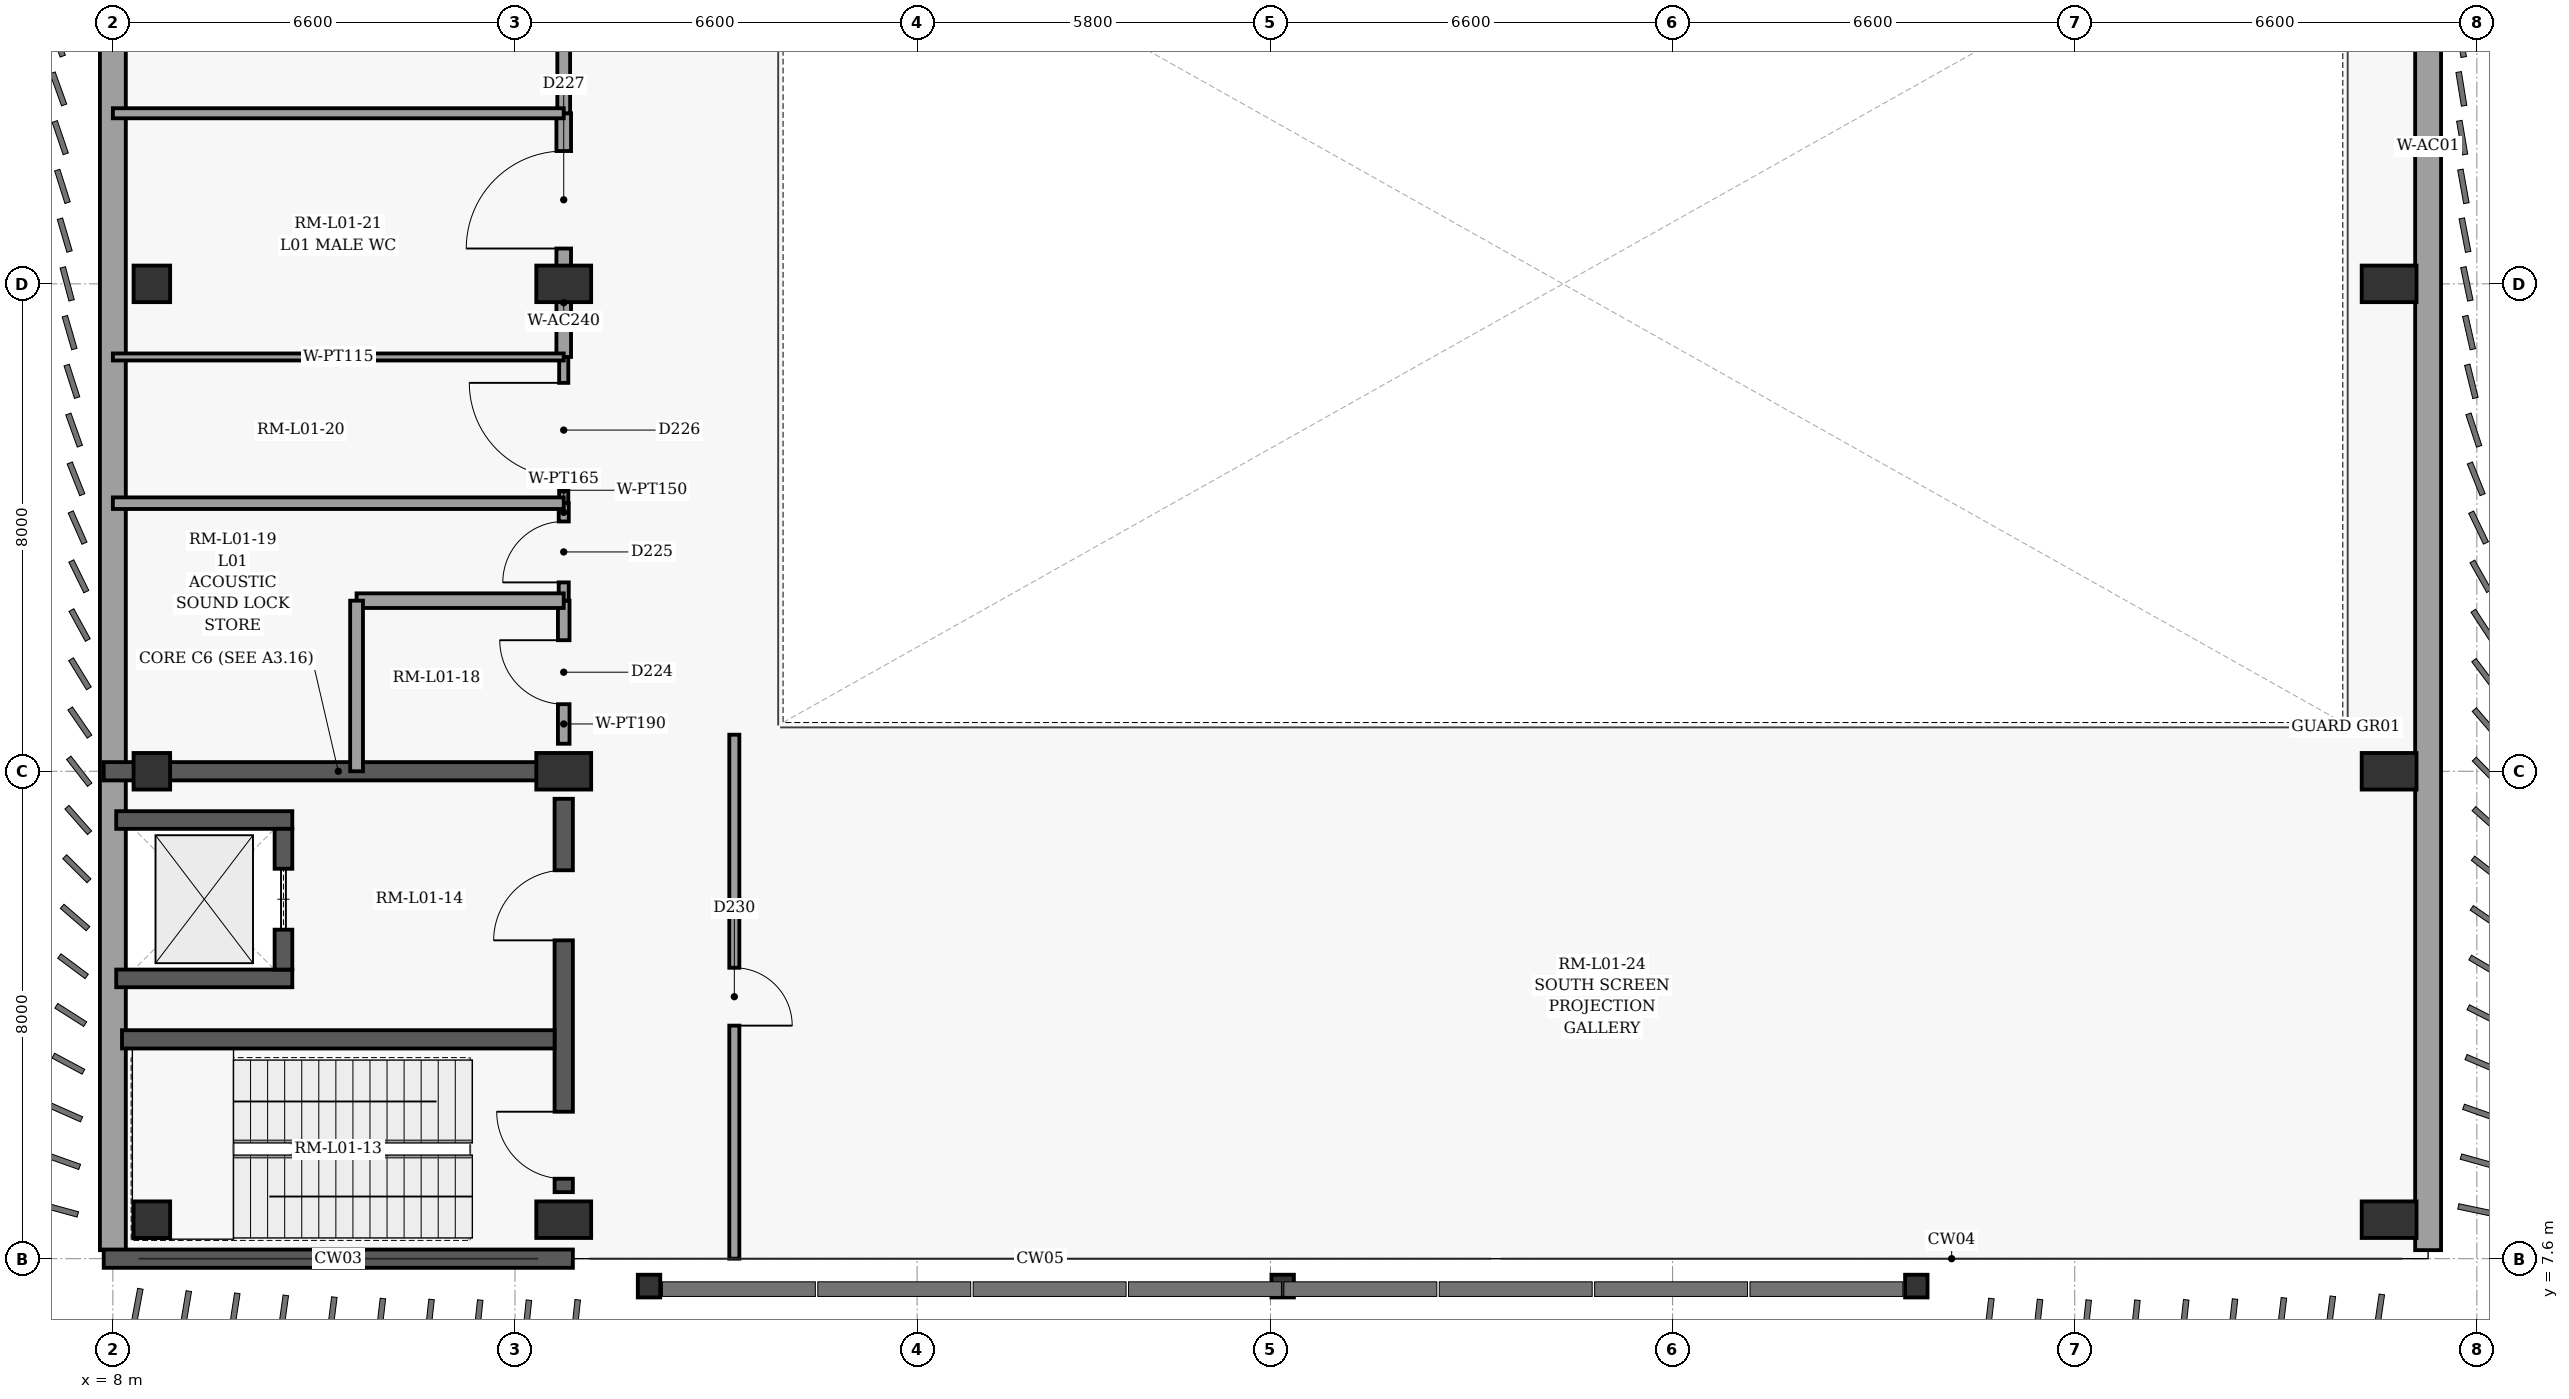
"""IFC4 building model, lengths in metres.
Left out: names, types, materials, properties, quantities, classifications, styles, units other than length and angle.
Written with IfcOpenShell. Run it as: python <this file> out.ifc"""

import sys

from ifc_helpers import new_model, si_unit, direction, frame, frame_2d, origin, origin_2d, place, context, subcontext, project, spatial, rectangle, i_section, extrude, element, fill, save


model = new_model("IFC4")
c1 = context("Model", 3, precision=1e-05, world=origin(), true_north=direction((0.0, 1.0)))
c2 = subcontext(c1, "Body", "Model", "MODEL_VIEW")
j1 = project(units=[si_unit("LENGTHUNIT", "METRE"), si_unit("PLANEANGLEUNIT", "RADIAN")], contexts=[c1])
p1 = place(None, origin())
s1 = spatial("IfcSite", under=j1, at=p1, CompositionType="ELEMENT")
p2 = place(p1, origin())
s2 = spatial("IfcBuilding", under=s1, at=p2, CompositionType="ELEMENT")
p3 = place(p2, frame((0.0, 0.0, 5.4)))
s3 = spatial("IfcBuildingStorey", under=s2, at=p3, CompositionType="ELEMENT", Elevation=5.4)
for number, where, z_axis, x_axis in (
    (1, (8.64, 8.24, 0.0), (0.0, 0.0, 1.0), (1.0, 0.0, 0.0)),
    (2, (8.64, 15.6, 0.0), (0.0, 0.0, 1.0), (1.0, 0.0, 0.0)),
    (3, (8.64, 23.6, 0.0), (0.0, 0.0, 1.0), (1.0, 0.0, 0.0)),
):
    element("IfcColumn", number, at=place(p3, frame(where, z_axis=z_axis, x_axis=x_axis)), inside=s3, PredefinedType="COLUMN", context=c2, shape_type="SweptSolid", body=[
        extrude(rectangle(XDim=0.6, YDim=0.6, at=origin_2d()), origin(), (0.0, 0.0, 1.0), 4.8),
    ])
for number, where, z_axis, x_axis in (
    (4, (15.4, 8.24, 0.0), (0.0, 0.0, 1.0), (1.0, 0.0, 0.0)),
    (5, (15.4, 15.6, 0.0), (0.0, 0.0, 1.0), (1.0, 0.0, 0.0)),
    (6, (15.4, 23.6, 0.0), (0.0, 0.0, 1.0), (1.0, 0.0, 0.0)),
    (7, (45.36, 8.24, 0.0), (0.0, 0.0, 1.0), (1.0, 0.0, 0.0)),
    (8, (45.36, 15.6, 0.0), (0.0, 0.0, 1.0), (1.0, 0.0, 0.0)),
    (9, (45.36, 23.6, 0.0), (0.0, 0.0, 1.0), (1.0, 0.0, 0.0)),
):
    element("IfcColumn", number, at=place(p3, frame(where, z_axis=z_axis, x_axis=x_axis)), inside=s3, PredefinedType="COLUMN", context=c2, shape_type="SweptSolid", body=[
        extrude(rectangle(XDim=0.6, YDim=0.9, at=origin_2d()), origin(), (0.0, 0.0, 1.0), 4.8),
    ])
for number, where, z_axis, x_axis in (
    (10, (16.8, 7.15, 0.0), (0.0, 0.0, 1.0), (1.0, 0.0, 0.0)),
    (11, (27.2, 7.15, 0.0), (0.0, 0.0, 1.0), (1.0, 0.0, 0.0)),
    (12, (37.6, 7.15, 0.0), (0.0, 0.0, 1.0), (1.0, 0.0, 0.0)),
):
    element("IfcColumn", number, at=place(p3, frame(where, z_axis=z_axis, x_axis=x_axis)), inside=s3, PredefinedType="COLUMN", context=c2, shape_type="SweptSolid", body=[
        extrude(i_section(OverallWidth=0.373, OverallDepth=0.368, WebThickness=0.014, FlangeThickness=0.024, at=origin_2d()), origin(), (0.0, 0.0, 1.0), 4.8),
    ])
for number, where, z_axis, x_axis in (
    (13, (46.0, 63.46, 0.0), (0.0, 0.0, 1.0), (0.0, -1.0, 0.0)),
    (14, (8.0, 7.74, 0.0), (0.0, 0.0, 1.0), (0.0, 1.0, 0.0)),
):
    element("IfcWall", number, at=place(p3, frame(where, z_axis=z_axis, x_axis=x_axis)), inside=s3, PredefinedType="SOLIDWALL", context=c2, shape_type="SweptSolid", body=[
        extrude(rectangle(XDim=55.72, YDim=0.425, at=frame_2d((27.86, 0.0))), origin(), (0.0, 0.0, 1.0), 4.52),
    ])
p4 = place(p3, frame((7.85, 7.6, 0.0), z_axis=(0.0, 0.0, 1.0), x_axis=(1.0, 0.0, 0.0)))
e15 = element("IfcWall", 15, at=p4, inside=s3, PredefinedType="SHEAR", context=c2, shape_type="SweptSolid", body=[
    extrude(rectangle(XDim=7.7, YDim=0.3, at=frame_2d((3.85, 0.0))), origin(), (0.0, 0.0, 1.0), 4.52),
])
p5 = place(p3, frame((7.85, 15.6, 0.0), z_axis=(0.0, 0.0, 1.0), x_axis=(1.0, 0.0, 0.0)))
e16 = element("IfcWall", 16, at=p5, inside=s3, PredefinedType="SHEAR", context=c2, shape_type="SweptSolid", body=[
    extrude(rectangle(XDim=7.248, YDim=0.3, at=frame_2d((3.624, 0.0))), origin(), (0.0, 0.0, 1.0), 4.52),
])
p6 = place(p3, frame((15.4, 8.692, 0.0), z_axis=(0.0, 0.0, 1.0), x_axis=(0.0, 1.0, 0.0)))
e17 = element("IfcWall", 17, at=p6, inside=s3, PredefinedType="SHEAR", context=c2, shape_type="SweptSolid", body=[
    extrude(rectangle(XDim=6.456, YDim=0.3, at=frame_2d((3.228, 0.0))), origin(), (0.0, 0.0, 1.0), 4.52),
])
p7 = place(p6, frame((0.22, 0.0, 0.0)))
e18 = element("IfcOpeningElement", 18, at=p7, cuts=e17, PredefinedType="OPENING", context=c2, shape_type="SweptSolid", body=[
    extrude(rectangle(XDim=1.1, YDim=2.15, at=frame_2d((0.55, 1.075))), frame((0.0, 0.16, 0.0), z_axis=(0.0, -1.0, 0.0), x_axis=(1.0, 0.0, 0.0)), (0.0, 0.0, 1.0), 0.32),
])
p8 = place(p6, frame((4.133, 0.0, 0.0)))
e19 = element("IfcOpeningElement", 19, at=p8, cuts=e17, PredefinedType="OPENING", context=c2, shape_type="SweptSolid", body=[
    extrude(rectangle(XDim=1.15, YDim=2.2, at=frame_2d((0.575, 1.1))), frame((0.0, 0.16, 0.0), z_axis=(0.0, -1.0, 0.0), x_axis=(1.0, 0.0, 0.0)), (0.0, 0.0, 1.0), 0.32),
])
p9 = place(p3, frame((8.15, 11.2, 0.0), z_axis=(0.0, 0.0, 1.0), x_axis=(1.0, 0.0, 0.0)))
e20 = element("IfcWall", 20, at=p9, inside=s3, PredefinedType="SHEAR", context=c2, shape_type="SweptSolid", body=[
    extrude(rectangle(XDim=7.1, YDim=0.3, at=frame_2d((3.55, 0.0))), origin(), (0.0, 0.0, 1.0), 4.52),
])
for number, where, z_axis, x_axis in (
    (21, (8.055, 12.2, 0.0), (0.0, 0.0, 1.0), (1.0, 0.0, 0.0)),
    (22, (8.055, 14.8, 0.0), (0.0, 0.0, 1.0), (1.0, 0.0, 0.0)),
):
    element("IfcWall", number, at=place(p3, frame(where, z_axis=z_axis, x_axis=x_axis)), inside=s3, PredefinedType="SHEAR", context=c2, shape_type="SweptSolid", body=[
        extrude(rectangle(XDim=2.89, YDim=0.29, at=frame_2d((1.445, 0.0))), origin(), (0.0, 0.0, 1.0), 4.52),
    ])
p10 = place(p3, frame((10.8, 12.345, 0.0), z_axis=(0.0, 0.0, 1.0), x_axis=(0.0, 1.0, 0.0)))
e23 = element("IfcWall", 23, at=p10, inside=s3, PredefinedType="SHEAR", context=c2, shape_type="SweptSolid", body=[
    extrude(rectangle(XDim=2.31, YDim=0.29, at=frame_2d((1.155, 0.0))), origin(), (0.0, 0.0, 1.0), 4.52),
])
p11 = place(p10, frame((0.655, 0.0, 0.0)))
e24 = element("IfcOpeningElement", 24, at=p11, cuts=e23, PredefinedType="OPENING", context=c2, shape_type="SweptSolid", body=[
    extrude(rectangle(XDim=1.0, YDim=2.15, at=frame_2d((0.5, 1.075))), frame((0.0, 0.155, 0.0), z_axis=(0.0, -1.0, 0.0), x_axis=(1.0, 0.0, 0.0)), (0.0, 0.0, 1.0), 0.31),
])
p12 = place(p3, frame((15.4, 16.052, 0.0), z_axis=(0.0, 0.0, 1.0), x_axis=(0.0, 1.0, 0.0)))
e25 = element("IfcWall", 25, at=p12, inside=s3, PredefinedType="PARTITIONING", context=c2, shape_type="SweptSolid", body=[
    extrude(rectangle(XDim=2.348, YDim=0.19, at=frame_2d((1.174, 0.0))), origin(), (0.0, 0.0, 1.0), 3.67),
])
p13 = place(p12, frame((0.649, 0.0, 0.0)))
e26 = element("IfcOpeningElement", 26, at=p13, cuts=e25, PredefinedType="OPENING", context=c2, shape_type="SweptSolid", body=[
    extrude(rectangle(XDim=1.05, YDim=2.15, at=frame_2d((0.525, 1.075))), frame((0.0, 0.105, 0.0), z_axis=(0.0, -1.0, 0.0), x_axis=(1.0, 0.0, 0.0)), (0.0, 0.0, 1.0), 0.21),
])
p14 = place(p3, frame((15.4, 18.4, 0.0), z_axis=(0.0, 0.0, 1.0), x_axis=(0.0, 1.0, 0.0)))
e27 = element("IfcWall", 27, at=p14, inside=s3, PredefinedType="PARTITIONING", context=c2, shape_type="SweptSolid", body=[
    extrude(rectangle(XDim=1.6, YDim=0.165, at=frame_2d((0.8, 0.0))), origin(), (0.0, 0.0, 1.0), 3.67),
])
p15 = place(p14, frame((0.3, 0.0, 0.0)))
e28 = element("IfcOpeningElement", 28, at=p15, cuts=e27, PredefinedType="OPENING", context=c2, shape_type="SweptSolid", body=[
    extrude(rectangle(XDim=1.0, YDim=2.1, at=frame_2d((0.5, 1.05))), frame((0.0, 0.093, 0.0), z_axis=(0.0, -1.0, 0.0), x_axis=(1.0, 0.0, 0.0)), (0.0, 0.0, 1.0), 0.185),
])
p16 = place(p3, frame((15.4, 20.0, 0.0), z_axis=(0.0, 0.0, 1.0), x_axis=(0.0, 1.0, 0.0)))
e29 = element("IfcWall", 29, at=p16, inside=s3, PredefinedType="PARTITIONING", context=c2, shape_type="SweptSolid", body=[
    extrude(rectangle(XDim=2.4, YDim=0.15, at=frame_2d((1.2, 0.0))), origin(), (0.0, 0.0, 1.0), 3.67),
])
p17 = place(p16, frame((0.425, 0.0, 0.0)))
e30 = element("IfcOpeningElement", 30, at=p17, cuts=e29, PredefinedType="OPENING", context=c2, shape_type="SweptSolid", body=[
    extrude(rectangle(XDim=1.55, YDim=2.25, at=frame_2d((0.775, 1.125))), frame((0.0, 0.085, 0.0), z_axis=(0.0, -1.0, 0.0), x_axis=(1.0, 0.0, 0.0)), (0.0, 0.0, 1.0), 0.17),
])
p18 = place(p3, frame((15.4, 22.4, 0.0), z_axis=(0.0, 0.0, 1.0), x_axis=(0.0, 1.0, 0.0)))
e31 = element("IfcWall", 31, at=p18, inside=s3, PredefinedType="PARTITIONING", context=c2, shape_type="SweptSolid", body=[
    extrude(rectangle(XDim=4.0, YDim=0.24, at=frame_2d((2.0, 0.0))), origin(), (0.0, 0.0, 1.0), 3.67),
])
p19 = place(p18, frame((1.78, 0.0, 0.0)))
e32 = element("IfcOpeningElement", 32, at=p19, cuts=e31, PredefinedType="OPENING", context=c2, shape_type="SweptSolid", body=[
    extrude(rectangle(XDim=1.6, YDim=2.3, at=frame_2d((0.8, 1.15))), frame((0.0, 0.13, 0.0), z_axis=(0.0, -1.0, 0.0), x_axis=(1.0, 0.0, 0.0)), (0.0, 0.0, 1.0), 0.26),
])
p20 = place(p3, frame((15.4, 26.4, 0.0), z_axis=(0.0, 0.0, 1.0), x_axis=(0.0, 1.0, 0.0)))
e33 = element("IfcWall", 33, at=p20, inside=s3, PredefinedType="PARTITIONING", context=c2, shape_type="SweptSolid", body=[
    extrude(rectangle(XDim=20.748, YDim=0.21, at=frame_2d((10.374, 0.0))), origin(), (0.0, 0.0, 1.0), 3.67),
])
p21 = place(p20, frame((9.834, 0.0, 0.0)))
e34 = element("IfcOpeningElement", 34, at=p21, cuts=e33, PredefinedType="OPENING", context=c2, shape_type="SweptSolid", body=[
    extrude(rectangle(XDim=1.08, YDim=2.15, at=frame_2d((0.54, 1.075))), frame((0.0, 0.115, 0.0), z_axis=(0.0, -1.0, 0.0), x_axis=(1.0, 0.0, 0.0)), (0.0, 0.0, 1.0), 0.23),
])
p22 = place(p3, frame((18.2, 16.2, 0.0), z_axis=(0.0, 0.0, 1.0), x_axis=(0.0, -1.0, 0.0)))
e35 = element("IfcWall", 35, at=p22, inside=s3, PredefinedType="PARTITIONING", context=c2, shape_type="SweptSolid", body=[
    extrude(rectangle(XDim=8.6, YDim=0.165, at=frame_2d((4.3, 0.0))), origin(), (0.0, 0.0, 1.0), 4.52),
])
p23 = place(p22, frame((3.825, 0.0, 0.0)))
e36 = element("IfcOpeningElement", 36, at=p23, cuts=e35, PredefinedType="OPENING", context=c2, shape_type="SweptSolid", body=[
    extrude(rectangle(XDim=0.95, YDim=2.1, at=frame_2d((0.475, 1.05))), frame((0.0, 0.093, 0.0), z_axis=(0.0, -1.0, 0.0), x_axis=(1.0, 0.0, 0.0)), (0.0, 0.0, 1.0), 0.185),
])
p24 = place(p3, frame((12.0, 18.4, 0.0), z_axis=(0.0, 0.0, 1.0), x_axis=(1.0, 0.0, 0.0)))
e37 = element("IfcWall", 37, at=p24, inside=s3, PredefinedType="PARTITIONING", context=c2, shape_type="SweptSolid", body=[
    extrude(rectangle(XDim=3.4, YDim=0.24, at=frame_2d((1.7, 0.0))), origin(), (0.0, 0.0, 1.0), 4.52),
])
p25 = place(p3, frame((12.0, 15.6, 0.0), z_axis=(0.0, 0.0, 1.0), x_axis=(0.0, 1.0, 0.0)))
e38 = element("IfcWall", 38, at=p25, inside=s3, PredefinedType="PARTITIONING", context=c2, shape_type="SweptSolid", body=[
    extrude(rectangle(XDim=2.8, YDim=0.21, at=frame_2d((1.4, 0.0))), origin(), (0.0, 0.0, 1.0), 4.52),
])
p26 = place(p3, frame((8.0, 20.0, 0.0), z_axis=(0.0, 0.0, 1.0), x_axis=(1.0, 0.0, 0.0)))
e39 = element("IfcWall", 39, at=p26, inside=s3, PredefinedType="PARTITIONING", context=c2, shape_type="SweptSolid", body=[
    extrude(rectangle(XDim=7.4, YDim=0.19, at=frame_2d((3.7, 0.0))), origin(), (0.0, 0.0, 1.0), 4.52),
])
p27 = place(p3, frame((8.0, 22.4, 0.0), z_axis=(0.0, 0.0, 1.0), x_axis=(1.0, 0.0, 0.0)))
e40 = element("IfcWall", 40, at=p27, inside=s3, PredefinedType="PARTITIONING", context=c2, shape_type="SweptSolid", body=[
    extrude(rectangle(XDim=7.4, YDim=0.115, at=frame_2d((3.7, 0.0))), origin(), (0.0, 0.0, 1.0), 4.52),
])
p28 = place(p3, frame((8.0, 26.4, 0.0), z_axis=(0.0, 0.0, 1.0), x_axis=(1.0, 0.0, 0.0)))
e41 = element("IfcWall", 41, at=p28, inside=s3, PredefinedType="PARTITIONING", context=c2, shape_type="SweptSolid", body=[
    extrude(rectangle(XDim=7.4, YDim=0.165, at=frame_2d((3.7, 0.0))), origin(), (0.0, 0.0, 1.0), 4.52),
])
p29 = place(p7, origin())
e42 = element("IfcDoor", 42, at=p29, inside=s3, OperationType="SINGLE_SWING_RIGHT", PredefinedType="DOOR", context=c2, shape_type="SweptSolid", body=[
    extrude(rectangle(XDim=1.1, YDim=2.15, at=frame_2d((0.55, 1.075))), frame((0.0, 0.025, 0.0), z_axis=(0.0, -1.0, 0.0), x_axis=(1.0, 0.0, 0.0)), (0.0, 0.0, 1.0), 0.05),
])
fill(e18, e42)
p30 = place(p8, origin())
e43 = element("IfcDoor", 43, at=p30, inside=s3, OperationType="SINGLE_SWING_LEFT", PredefinedType="DOOR", context=c2, shape_type="SweptSolid", body=[
    extrude(rectangle(XDim=1.15, YDim=2.2, at=frame_2d((0.575, 1.1))), frame((0.0, 0.025, 0.0), z_axis=(0.0, -1.0, 0.0), x_axis=(1.0, 0.0, 0.0)), (0.0, 0.0, 1.0), 0.05),
])
fill(e19, e43)
p31 = place(p11, origin())
e44 = element("IfcDoor", 44, at=p31, inside=s3, OperationType="SLIDING_TO_LEFT", PredefinedType="DOOR", context=c2, shape_type="SweptSolid", body=[
    extrude(rectangle(XDim=1.0, YDim=2.15, at=frame_2d((0.5, 1.075))), frame((0.0, 0.025, 0.0), z_axis=(0.0, -1.0, 0.0), x_axis=(1.0, 0.0, 0.0)), (0.0, 0.0, 1.0), 0.05),
])
fill(e24, e44)
p32 = place(p13, origin())
e45 = element("IfcDoor", 45, at=p32, inside=s3, OperationType="SINGLE_SWING_RIGHT", PredefinedType="DOOR", context=c2, shape_type="SweptSolid", body=[
    extrude(rectangle(XDim=1.05, YDim=2.15, at=frame_2d((0.525, 1.075))), frame((0.0, 0.025, 0.0), z_axis=(0.0, -1.0, 0.0), x_axis=(1.0, 0.0, 0.0)), (0.0, 0.0, 1.0), 0.05),
])
fill(e26, e45)
p33 = place(p15, origin())
e46 = element("IfcDoor", 46, at=p33, inside=s3, OperationType="SINGLE_SWING_LEFT", PredefinedType="DOOR", context=c2, shape_type="SweptSolid", body=[
    extrude(rectangle(XDim=1.0, YDim=2.1, at=frame_2d((0.5, 1.05))), frame((0.0, 0.025, 0.0), z_axis=(0.0, -1.0, 0.0), x_axis=(1.0, 0.0, 0.0)), (0.0, 0.0, 1.0), 0.05),
])
fill(e28, e46)
p34 = place(p17, origin())
e47 = element("IfcDoor", 47, at=p34, inside=s3, OperationType="SINGLE_SWING_RIGHT", PredefinedType="DOOR", context=c2, shape_type="SweptSolid", body=[
    extrude(rectangle(XDim=1.55, YDim=2.25, at=frame_2d((0.775, 1.125))), frame((0.0, 0.025, 0.0), z_axis=(0.0, -1.0, 0.0), x_axis=(1.0, 0.0, 0.0)), (0.0, 0.0, 1.0), 0.05),
])
fill(e30, e47)
p35 = place(p19, origin())
e48 = element("IfcDoor", 48, at=p35, inside=s3, OperationType="SINGLE_SWING_LEFT", PredefinedType="DOOR", context=c2, shape_type="SweptSolid", body=[
    extrude(rectangle(XDim=1.6, YDim=2.3, at=frame_2d((0.8, 1.15))), frame((0.0, 0.025, 0.0), z_axis=(0.0, -1.0, 0.0), x_axis=(1.0, 0.0, 0.0)), (0.0, 0.0, 1.0), 0.05),
])
fill(e32, e48)
p36 = place(p23, origin())
e49 = element("IfcDoor", 49, at=p36, inside=s3, OperationType="SINGLE_SWING_RIGHT", PredefinedType="DOOR", context=c2, shape_type="SweptSolid", body=[
    extrude(rectangle(XDim=0.95, YDim=2.1, at=frame_2d((0.475, 1.05))), frame((0.0, 0.025, 0.0), z_axis=(0.0, -1.0, 0.0), x_axis=(1.0, 0.0, 0.0)), (0.0, 0.0, 1.0), 0.05),
])
fill(e36, e49)
save(model, sys.argv[1])
